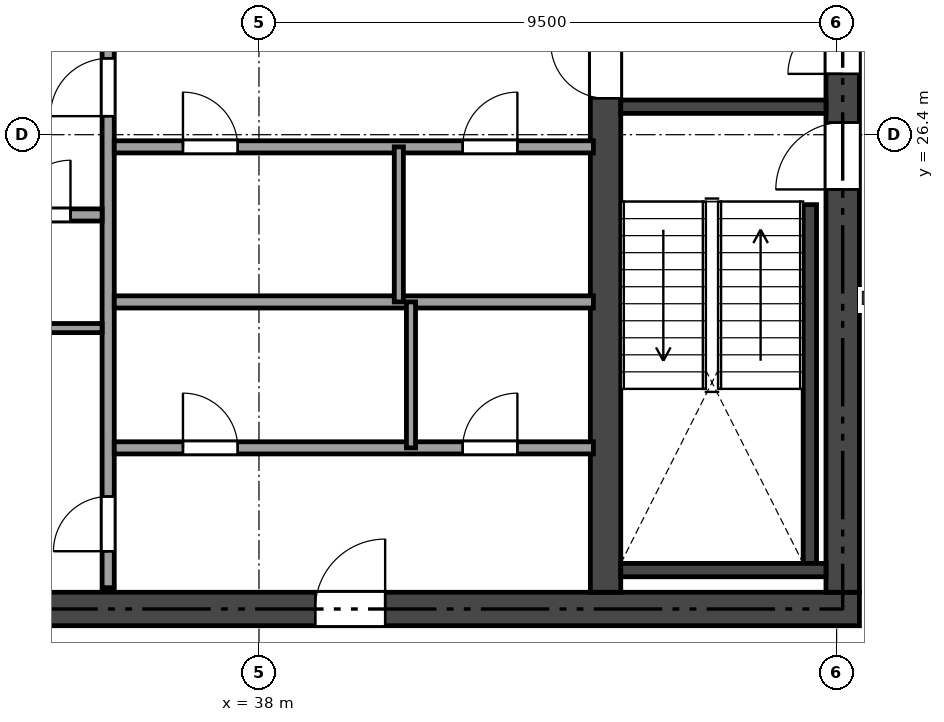
"""IFC4 building model, lengths in metres.
Left out: names, types, materials, properties, quantities, classifications, styles, units other than length and angle.
Written with IfcOpenShell. Run it as: python <this file> out.ifc"""

import sys

from ifc_helpers import new_model, si_unit, direction, frame, frame_2d, origin, place, context, subcontext, project, spatial, rectangle, extrude, element, fill, save


model = new_model("IFC4")
c1 = context("Model", 3, precision=1e-05, world=origin(), true_north=direction((0.0, 1.0)))
c2 = subcontext(c1, "Body", "Model", "MODEL_VIEW")
j1 = project(units=[si_unit("LENGTHUNIT", "METRE"), si_unit("PLANEANGLEUNIT", "RADIAN")], contexts=[c1])
p1 = place(None, origin())
s1 = spatial("IfcSite", under=j1, at=p1, CompositionType="ELEMENT")
p2 = place(p1, origin())
s2 = spatial("IfcBuilding", under=s1, at=p2, CompositionType="ELEMENT")
p3 = place(p2, frame((0.0, 0.0, 279.3)))
s3 = spatial("IfcBuildingStorey", under=s2, at=p3, CompositionType="ELEMENT", Elevation=279.3)
p4 = place(p3, frame((26.525, 18.6, 0.0), z_axis=(0.0, 0.0, 1.0), x_axis=(1.0, 0.0, 0.0)))
e1 = element("IfcWall", 1, at=p4, inside=s3, PredefinedType="SHEAR", context=c2, shape_type="SweptSolid", body=[
    extrude(rectangle(XDim=21.35, YDim=0.55, at=frame_2d((10.675, 0.0))), origin(), (0.0, 0.0, 1.0), 3.84),
])
p5 = place(p4, frame((12.4, 0.0, 0.0)))
e2 = element("IfcOpeningElement", 2, at=p5, cuts=e1, PredefinedType="OPENING", context=c2, shape_type="SweptSolid", body=[
    extrude(rectangle(XDim=1.15, YDim=2.15, at=frame_2d((0.575, 1.075))), frame((0.0, 0.285, 0.0), z_axis=(0.0, -1.0, 0.0), x_axis=(1.0, 0.0, 0.0)), (0.0, 0.0, 1.0), 0.57),
])
p6 = place(p4, frame((5.225, 0.0, 0.0)))
e3 = element("IfcOpeningElement", 3, at=p6, cuts=e1, PredefinedType="OPENING", context=c2, shape_type="SweptSolid", body=[
    extrude(rectangle(XDim=0.9, YDim=2.1, at=frame_2d((0.45, 1.05))), frame((0.0, 0.285, 0.0), z_axis=(0.0, -1.0, 0.0), x_axis=(1.0, 0.0, 0.0)), (0.0, 0.0, 1.0), 0.57),
])
p7 = place(p3, frame((47.6, 18.875, 0.0), z_axis=(0.0, 0.0, 1.0), x_axis=(0.0, 1.0, 0.0)))
e4 = element("IfcWall", 4, at=p7, inside=s3, PredefinedType="SHEAR", context=c2, shape_type="SweptSolid", body=[
    extrude(rectangle(XDim=15.05, YDim=0.55, at=frame_2d((7.525, 0.0))), origin(), (0.0, 0.0, 1.0), 3.84),
])
p8 = place(p7, frame((6.625, 0.0, 0.0)))
e5 = element("IfcOpeningElement", 5, at=p8, cuts=e4, PredefinedType="OPENING", context=c2, shape_type="SweptSolid", body=[
    extrude(rectangle(XDim=1.1, YDim=2.15, at=frame_2d((0.55, 1.075))), frame((0.0, 0.285, 0.0), z_axis=(0.0, -1.0, 0.0), x_axis=(1.0, 0.0, 0.0)), (0.0, 0.0, 1.0), 0.57),
])
p9 = place(p7, frame((8.525, 0.0, 0.0)))
e6 = element("IfcOpeningElement", 6, at=p9, cuts=e4, PredefinedType="OPENING", context=c2, shape_type="SweptSolid", body=[
    extrude(rectangle(XDim=0.9, YDim=2.1, at=frame_2d((0.45, 1.05))), frame((0.0, 0.285, 0.0), z_axis=(0.0, -1.0, 0.0), x_axis=(1.0, 0.0, 0.0)), (0.0, 0.0, 1.0), 0.57),
])
p10 = place(p7, frame((13.175, 0.0, 0.0)))
e7 = element("IfcOpeningElement", 7, at=p10, cuts=e4, PredefinedType="OPENING", context=c2, shape_type="SweptSolid", body=[
    extrude(rectangle(XDim=0.9, YDim=2.1, at=frame_2d((0.45, 1.05))), frame((0.0, 0.285, 0.0), z_axis=(0.0, -1.0, 0.0), x_axis=(1.0, 0.0, 0.0)), (0.0, 0.0, 1.0), 0.57),
])
p11 = place(p3, frame((43.7, 18.875, 0.0), z_axis=(0.0, 0.0, 1.0), x_axis=(0.0, 1.0, 0.0)))
e8 = element("IfcWall", 8, at=p11, inside=s3, PredefinedType="SHEAR", context=c2, shape_type="SweptSolid", body=[
    extrude(rectangle(XDim=15.05, YDim=0.5, at=frame_2d((7.525, 0.0))), origin(), (0.0, 0.0, 1.0), 3.84),
])
p12 = place(p11, frame((8.125, 0.0, 0.0)))
e9 = element("IfcOpeningElement", 9, at=p12, cuts=e8, PredefinedType="OPENING", context=c2, shape_type="SweptSolid", body=[
    extrude(rectangle(XDim=0.9, YDim=2.1, at=frame_2d((0.45, 1.05))), frame((0.0, 0.26, 0.0), z_axis=(0.0, -1.0, 0.0), x_axis=(1.0, 0.0, 0.0)), (0.0, 0.0, 1.0), 0.52),
])
p13 = place(p3, frame((43.95, 26.86, 0.0), z_axis=(0.0, 0.0, 1.0), x_axis=(1.0, 0.0, 0.0)))
e10 = element("IfcWall", 10, at=p13, inside=s3, PredefinedType="SHEAR", context=c2, shape_type="SweptSolid", body=[
    extrude(rectangle(XDim=3.375, YDim=0.22, at=frame_2d((1.688, 0.0))), origin(), (0.0, 0.0, 1.0), 3.84),
])
p14 = place(p3, frame((47.06, 19.35, 0.0), z_axis=(0.0, 0.0, 1.0), x_axis=(0.0, 1.0, 0.0)))
e11 = element("IfcWall", 11, at=p14, inside=s3, PredefinedType="SHEAR", context=c2, shape_type="SweptSolid", body=[
    extrude(rectangle(XDim=5.9, YDim=0.22, at=frame_2d((2.95, 0.0))), origin(), (0.0, 0.0, 1.0), 3.84),
])
p15 = place(p3, frame((43.95, 19.24, 0.0), z_axis=(0.0, 0.0, 1.0), x_axis=(1.0, 0.0, 0.0)))
e12 = element("IfcWall", 12, at=p15, inside=s3, PredefinedType="SHEAR", context=c2, shape_type="SweptSolid", body=[
    extrude(rectangle(XDim=3.375, YDim=0.22, at=frame_2d((1.688, 0.0))), origin(), (0.0, 0.0, 1.0), 3.84),
])
p16 = place(p3, frame((35.52, 18.95, 0.0), z_axis=(0.0, 0.0, 1.0), x_axis=(0.0, 1.0, 0.0)))
e13 = element("IfcWall", 13, at=p16, inside=s3, PredefinedType="SOLIDWALL", context=c2, shape_type="SweptSolid", body=[
    extrude(rectangle(XDim=14.9, YDim=0.2, at=frame_2d((7.45, 0.0))), origin(), (0.0, 0.0, 1.0), 3.361),
])
p17 = place(p16, frame((7.755, 0.0, 0.0)))
e14 = element("IfcOpeningElement", 14, at=p17, cuts=e13, PredefinedType="OPENING", context=c2, shape_type="SweptSolid", body=[
    extrude(rectangle(XDim=0.95, YDim=2.15, at=frame_2d((0.475, 1.075))), frame((0.0, 0.11, 0.0), z_axis=(0.0, -1.0, 0.0), x_axis=(1.0, 0.0, 0.0)), (0.0, 0.0, 1.0), 0.22),
])
p18 = place(p16, frame((0.6, 0.0, 0.0)))
e15 = element("IfcOpeningElement", 15, at=p18, cuts=e13, PredefinedType="OPENING", context=c2, shape_type="SweptSolid", body=[
    extrude(rectangle(XDim=0.9, YDim=2.1, at=frame_2d((0.45, 1.05))), frame((0.0, 0.11, 0.0), z_axis=(0.0, -1.0, 0.0), x_axis=(1.0, 0.0, 0.0)), (0.0, 0.0, 1.0), 0.22),
])
p19 = place(p3, frame((31.0, 25.08, 0.0), z_axis=(0.0, 0.0, 1.0), x_axis=(1.0, 0.0, 0.0)))
e16 = element("IfcWall", 16, at=p19, inside=s3, PredefinedType="SOLIDWALL", context=c2, shape_type="SweptSolid", body=[
    extrude(rectangle(XDim=4.42, YDim=0.2, at=frame_2d((2.21, 0.0))), origin(), (0.0, 0.0, 1.0), 3.84),
])
p20 = place(p19, frame((3.0, 0.0, 0.0)))
e17 = element("IfcOpeningElement", 17, at=p20, cuts=e16, PredefinedType="OPENING", context=c2, shape_type="SweptSolid", body=[
    extrude(rectangle(XDim=0.9, YDim=2.1, at=frame_2d((0.45, 1.05))), frame((0.0, 0.11, 0.0), z_axis=(0.0, -1.0, 0.0), x_axis=(1.0, 0.0, 0.0)), (0.0, 0.0, 1.0), 0.22),
])
p21 = place(p19, frame((0.62, 0.0, 0.0)))
e18 = element("IfcOpeningElement", 18, at=p21, cuts=e16, PredefinedType="OPENING", context=c2, shape_type="SweptSolid", body=[
    extrude(rectangle(XDim=1.2, YDim=2.15, at=frame_2d((0.6, 1.075))), frame((0.0, 0.11, 0.0), z_axis=(0.0, -1.0, 0.0), x_axis=(1.0, 0.0, 0.0)), (0.0, 0.0, 1.0), 0.22),
])
p22 = place(p3, frame((33.42, 23.22, 0.0), z_axis=(0.0, 0.0, 1.0), x_axis=(1.0, 0.0, 0.0)))
e19 = element("IfcWall", 19, at=p22, inside=s3, PredefinedType="PARTITIONING", context=c2, shape_type="SweptSolid", body=[
    extrude(rectangle(XDim=2.0, YDim=0.15, at=frame_2d((1.0, 0.0))), origin(), (0.0, 0.0, 1.0), 3.84),
])
p23 = place(p3, frame((35.62, 26.2, 0.0), z_axis=(0.0, 0.0, 1.0), x_axis=(1.0, 0.0, 0.0)))
e20 = element("IfcWall", 20, at=p23, inside=s3, PredefinedType="SOLIDWALL", context=c2, shape_type="SweptSolid", body=[
    extrude(rectangle(XDim=7.88, YDim=0.2, at=frame_2d((3.94, 0.0))), origin(), (0.0, 0.0, 1.0), 3.84),
])
p24 = place(p23, frame((1.13, 0.0, 0.0)))
e21 = element("IfcOpeningElement", 21, at=p24, cuts=e20, PredefinedType="OPENING", context=c2, shape_type="SweptSolid", body=[
    extrude(rectangle(XDim=0.9, YDim=2.1, at=frame_2d((0.45, 1.05))), frame((0.0, 0.11, 0.0), z_axis=(0.0, -1.0, 0.0), x_axis=(1.0, 0.0, 0.0)), (0.0, 0.0, 1.0), 0.22),
])
p25 = place(p23, frame((5.73, 0.0, 0.0)))
e22 = element("IfcOpeningElement", 22, at=p25, cuts=e20, PredefinedType="OPENING", context=c2, shape_type="SweptSolid", body=[
    extrude(rectangle(XDim=0.9, YDim=2.1, at=frame_2d((0.45, 1.05))), frame((0.0, 0.11, 0.0), z_axis=(0.0, -1.0, 0.0), x_axis=(1.0, 0.0, 0.0)), (0.0, 0.0, 1.0), 0.22),
])
p26 = place(p3, frame((35.62, 23.65, 0.0), z_axis=(0.0, 0.0, 1.0), x_axis=(1.0, 0.0, 0.0)))
e23 = element("IfcWall", 23, at=p26, inside=s3, PredefinedType="SOLIDWALL", context=c2, shape_type="SweptSolid", body=[
    extrude(rectangle(XDim=7.88, YDim=0.2, at=frame_2d((3.94, 0.0))), origin(), (0.0, 0.0, 1.0), 3.361),
])
p27 = place(p3, frame((35.62, 21.25, 0.0), z_axis=(0.0, 0.0, 1.0), x_axis=(1.0, 0.0, 0.0)))
e24 = element("IfcWall", 24, at=p27, inside=s3, PredefinedType="SOLIDWALL", context=c2, shape_type="SweptSolid", body=[
    extrude(rectangle(XDim=7.88, YDim=0.2, at=frame_2d((3.94, 0.0))), origin(), (0.0, 0.0, 1.0), 3.84),
])
p28 = place(p27, frame((1.13, 0.0, 0.0)))
e25 = element("IfcOpeningElement", 25, at=p28, cuts=e24, PredefinedType="OPENING", context=c2, shape_type="SweptSolid", body=[
    extrude(rectangle(XDim=0.9, YDim=2.1, at=frame_2d((0.45, 1.05))), frame((0.0, 0.11, 0.0), z_axis=(0.0, -1.0, 0.0), x_axis=(1.0, 0.0, 0.0)), (0.0, 0.0, 1.0), 0.22),
])
p29 = place(p27, frame((5.73, 0.0, 0.0)))
e26 = element("IfcOpeningElement", 26, at=p29, cuts=e24, PredefinedType="OPENING", context=c2, shape_type="SweptSolid", body=[
    extrude(rectangle(XDim=0.9, YDim=2.1, at=frame_2d((0.45, 1.05))), frame((0.0, 0.11, 0.0), z_axis=(0.0, -1.0, 0.0), x_axis=(1.0, 0.0, 0.0)), (0.0, 0.0, 1.0), 0.22),
])
p30 = place(p3, frame((40.3, 23.65, 0.0), z_axis=(0.0, 0.0, 1.0), x_axis=(0.0, 1.0, 0.0)))
e27 = element("IfcWall", 27, at=p30, inside=s3, PredefinedType="PARTITIONING", context=c2, shape_type="SweptSolid", body=[
    extrude(rectangle(XDim=2.55, YDim=0.15, at=frame_2d((1.275, 0.0))), origin(), (0.0, 0.0, 1.0), 3.361),
])
p31 = place(p3, frame((40.5, 21.25, 0.0), z_axis=(0.0, 0.0, 1.0), x_axis=(0.0, 1.0, 0.0)))
e28 = element("IfcWall", 28, at=p31, inside=s3, PredefinedType="PARTITIONING", context=c2, shape_type="SweptSolid", body=[
    extrude(rectangle(XDim=2.4, YDim=0.15, at=frame_2d((1.2, 0.0))), origin(), (0.0, 0.0, 1.0), 3.361),
])
p32 = place(p8, origin())
e29 = element("IfcDoor", 29, at=p32, inside=s3, OperationType="SINGLE_SWING_LEFT", PredefinedType="DOOR", context=c2, shape_type="SweptSolid", body=[
    extrude(rectangle(XDim=1.1, YDim=2.15, at=frame_2d((0.55, 1.075))), frame((0.0, 0.025, 0.0), z_axis=(0.0, -1.0, 0.0), x_axis=(1.0, 0.0, 0.0)), (0.0, 0.0, 1.0), 0.05),
])
fill(e5, e29)
p33 = place(p17, origin())
e30 = element("IfcDoor", 30, at=p33, inside=s3, OperationType="SINGLE_SWING_LEFT", PredefinedType="DOOR", context=c2, shape_type="SweptSolid", body=[
    extrude(rectangle(XDim=0.95, YDim=2.15, at=frame_2d((0.475, 1.075))), frame((0.0, 0.025, 0.0), z_axis=(0.0, -1.0, 0.0), x_axis=(1.0, 0.0, 0.0)), (0.0, 0.0, 1.0), 0.05),
])
fill(e14, e30)
p34 = place(p12, origin())
e31 = element("IfcDoor", 31, at=p34, inside=s3, OperationType="SINGLE_SWING_RIGHT", PredefinedType="DOOR", context=c2, shape_type="SweptSolid", body=[
    extrude(rectangle(XDim=0.9, YDim=2.1, at=frame_2d((0.45, 1.05))), frame((0.0, 0.025, 0.0), z_axis=(0.0, -1.0, 0.0), x_axis=(1.0, 0.0, 0.0)), (0.0, 0.0, 1.0), 0.05),
])
fill(e9, e31)
p35 = place(p9, origin())
e32 = element("IfcDoor", 32, at=p35, inside=s3, OperationType="SINGLE_SWING_LEFT", PredefinedType="DOOR", context=c2, shape_type="SweptSolid", body=[
    extrude(rectangle(XDim=0.9, YDim=2.1, at=frame_2d((0.45, 1.05))), frame((0.0, 0.025, 0.0), z_axis=(0.0, -1.0, 0.0), x_axis=(1.0, 0.0, 0.0)), (0.0, 0.0, 1.0), 0.05),
])
fill(e6, e32)
p36 = place(p5, origin())
e33 = element("IfcDoor", 33, at=p36, inside=s3, OperationType="SINGLE_SWING_RIGHT", PredefinedType="DOOR", context=c2, shape_type="SweptSolid", body=[
    extrude(rectangle(XDim=1.15, YDim=2.15, at=frame_2d((0.575, 1.075))), frame((0.0, 0.025, 0.0), z_axis=(0.0, -1.0, 0.0), x_axis=(1.0, 0.0, 0.0)), (0.0, 0.0, 1.0), 0.05),
])
fill(e2, e33)
p37 = place(p18, origin())
e34 = element("IfcDoor", 34, at=p37, inside=s3, OperationType="SINGLE_SWING_LEFT", PredefinedType="DOOR", context=c2, shape_type="SweptSolid", body=[
    extrude(rectangle(XDim=0.9, YDim=2.1, at=frame_2d((0.45, 1.05))), frame((0.0, 0.025, 0.0), z_axis=(0.0, -1.0, 0.0), x_axis=(1.0, 0.0, 0.0)), (0.0, 0.0, 1.0), 0.05),
])
fill(e15, e34)
p38 = place(p20, origin())
e35 = element("IfcDoor", 35, at=p38, inside=s3, OperationType="SINGLE_SWING_RIGHT", PredefinedType="DOOR", context=c2, shape_type="SweptSolid", body=[
    extrude(rectangle(XDim=0.9, YDim=2.1, at=frame_2d((0.45, 1.05))), frame((0.0, 0.025, 0.0), z_axis=(0.0, -1.0, 0.0), x_axis=(1.0, 0.0, 0.0)), (0.0, 0.0, 1.0), 0.05),
])
fill(e17, e35)
p39 = place(p28, origin())
e36 = element("IfcDoor", 36, at=p39, inside=s3, OperationType="SINGLE_SWING_LEFT", PredefinedType="DOOR", context=c2, shape_type="SweptSolid", body=[
    extrude(rectangle(XDim=0.9, YDim=2.1, at=frame_2d((0.45, 1.05))), frame((0.0, 0.025, 0.0), z_axis=(0.0, -1.0, 0.0), x_axis=(1.0, 0.0, 0.0)), (0.0, 0.0, 1.0), 0.05),
])
fill(e25, e36)
p40 = place(p29, origin())
e37 = element("IfcDoor", 37, at=p40, inside=s3, OperationType="SINGLE_SWING_RIGHT", PredefinedType="DOOR", context=c2, shape_type="SweptSolid", body=[
    extrude(rectangle(XDim=0.9, YDim=2.1, at=frame_2d((0.45, 1.05))), frame((0.0, 0.025, 0.0), z_axis=(0.0, -1.0, 0.0), x_axis=(1.0, 0.0, 0.0)), (0.0, 0.0, 1.0), 0.05),
])
fill(e26, e37)
p41 = place(p24, origin())
e38 = element("IfcDoor", 38, at=p41, inside=s3, OperationType="SINGLE_SWING_LEFT", PredefinedType="DOOR", context=c2, shape_type="SweptSolid", body=[
    extrude(rectangle(XDim=0.9, YDim=2.1, at=frame_2d((0.45, 1.05))), frame((0.0, 0.025, 0.0), z_axis=(0.0, -1.0, 0.0), x_axis=(1.0, 0.0, 0.0)), (0.0, 0.0, 1.0), 0.05),
])
fill(e21, e38)
p42 = place(p25, origin())
e39 = element("IfcDoor", 39, at=p42, inside=s3, OperationType="SINGLE_SWING_RIGHT", PredefinedType="DOOR", context=c2, shape_type="SweptSolid", body=[
    extrude(rectangle(XDim=0.9, YDim=2.1, at=frame_2d((0.45, 1.05))), frame((0.0, 0.025, 0.0), z_axis=(0.0, -1.0, 0.0), x_axis=(1.0, 0.0, 0.0)), (0.0, 0.0, 1.0), 0.05),
])
fill(e22, e39)
save(model, sys.argv[1])
